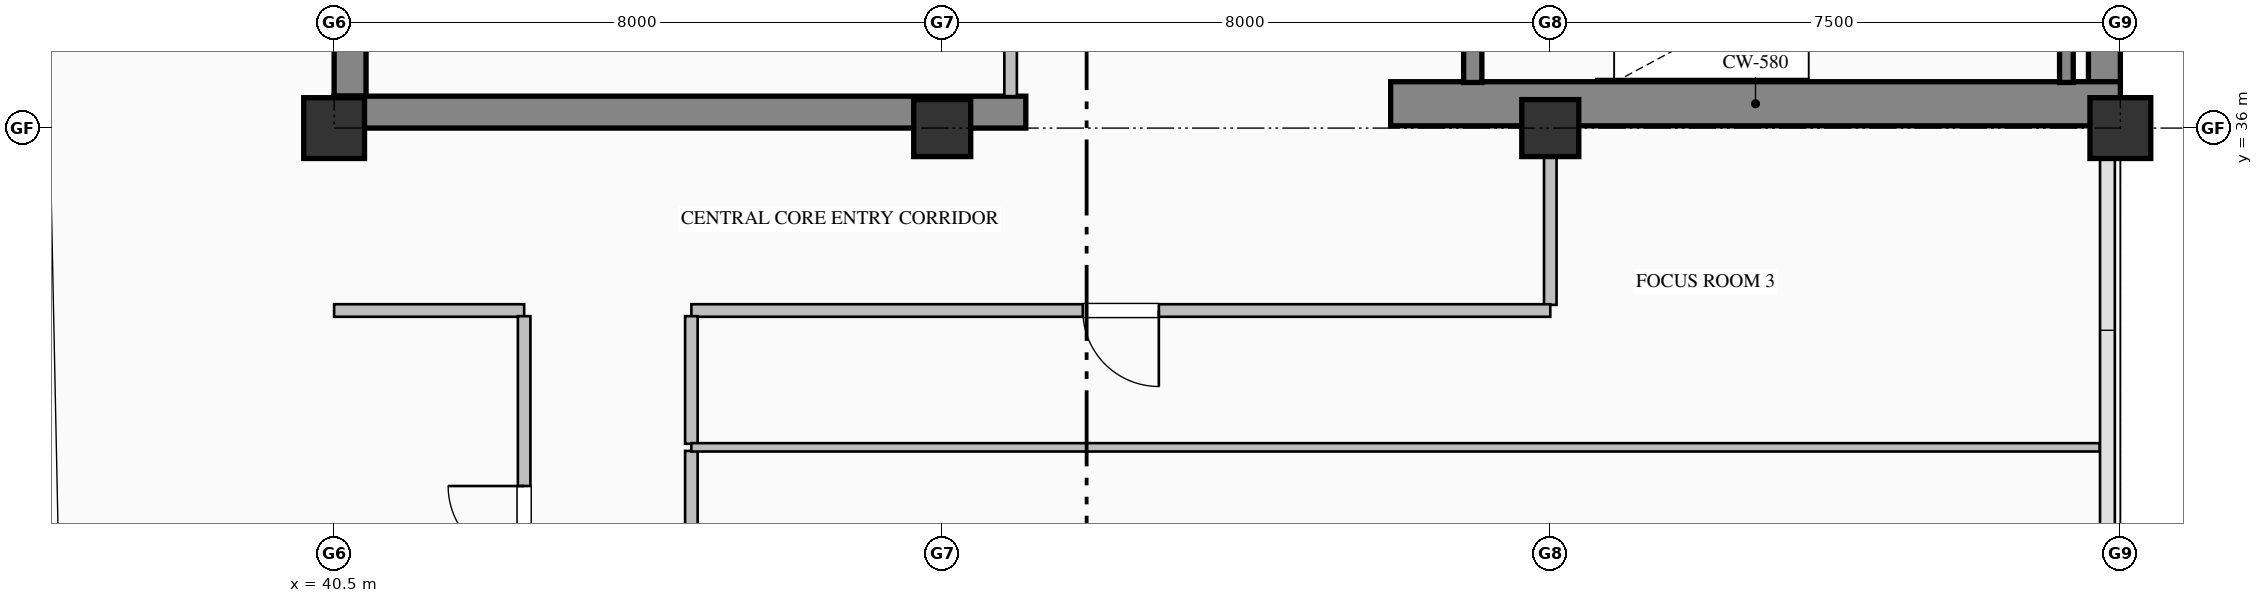
"""IFC4 building model, lengths in metres.
Left out: names, types, materials, properties, quantities, classifications, styles, units other than length and angle.
Written with IfcOpenShell. Run it as: python <this file> out.ifc"""

import sys

from ifc_helpers import new_model, si_unit, direction, frame, frame_2d, origin, origin_2d, place, context, subcontext, project, spatial, rectangle, hollow_rectangle, extrude, element, fill, save


model = new_model("IFC4")
c1 = context("Model", 3, precision=1e-05, world=origin(), true_north=direction((0.0, 1.0)))
c2 = subcontext(c1, "Body", "Model", "MODEL_VIEW")
j1 = project(units=[si_unit("LENGTHUNIT", "METRE"), si_unit("PLANEANGLEUNIT", "RADIAN")], contexts=[c1])
p1 = place(None, origin())
s1 = spatial("IfcSite", under=j1, at=p1, CompositionType="ELEMENT")
p2 = place(p1, origin())
s2 = spatial("IfcBuilding", under=s1, at=p2, CompositionType="ELEMENT")
p3 = place(p2, frame((0.0, 0.0, 295.2)))
s3 = spatial("IfcBuildingStorey", under=s2, at=p3, CompositionType="ELEMENT", Elevation=295.2)
p4 = place(p3, frame((63.79, 36.32, 0.0), z_axis=(0.0, 0.0, 1.0), x_axis=(0.0, 1.0, 0.0)))
e1 = element("IfcWall", 1, at=p4, inside=s3, PredefinedType="SHEAR", context=c2, shape_type="SweptSolid", body=[
    extrude(rectangle(XDim=15.26, YDim=0.42, at=frame_2d((7.63, 0.0))), origin(), (0.0, 0.0, 1.0), 3.785),
])
p5 = place(p3, frame((40.71, 36.42, 0.0), z_axis=(0.0, 0.0, 1.0), x_axis=(0.0, 1.0, 0.0)))
e2 = element("IfcWall", 2, at=p5, inside=s3, PredefinedType="SHEAR", context=c2, shape_type="SweptSolid", body=[
    extrude(rectangle(XDim=7.98, YDim=0.42, at=frame_2d((3.99, 0.0))), origin(), (0.0, 0.0, 1.0), 3.785),
])
p6 = place(p3, frame((40.5, 36.21, 0.0), z_axis=(0.0, 0.0, 1.0), x_axis=(1.0, 0.0, 0.0)))
e3 = element("IfcWall", 3, at=p6, inside=s3, PredefinedType="SHEAR", context=c2, shape_type="SweptSolid", body=[
    extrude(rectangle(XDim=9.1, YDim=0.42, at=frame_2d((4.55, 0.0))), origin(), (0.0, 0.0, 1.0), 3.785),
])
p7 = place(p3, frame((54.4, 36.32, 0.0), z_axis=(0.0, 0.0, 1.0), x_axis=(1.0, 0.0, 0.0)))
e4 = element("IfcWall", 4, at=p7, inside=s3, PredefinedType="SHEAR", context=c2, shape_type="SweptSolid", body=[
    extrude(rectangle(XDim=9.6, YDim=0.58, at=frame_2d((4.8, 0.0))), origin(), (0.0, 0.0, 1.0), 4.0),
])
p8 = place(p3, frame((40.5, 36.0, 0.0), z_axis=(0.0, 0.0, 1.0), x_axis=(1.0, 0.0, 0.0)))
e5 = element("IfcColumn", 5, at=p8, inside=s3, PredefinedType="COLUMN", context=c2, shape_type="SweptSolid", body=[
    extrude(hollow_rectangle(XDim=0.8, YDim=0.8, WallThickness=0.032, at=origin_2d()), origin(), (0.0, 0.0, 1.0), 4.0),
])
for number, where, z_axis, x_axis in (
    (6, (48.5, 36.0, 0.0), (0.0, 0.0, 1.0), (1.0, 0.0, 0.0)),
    (7, (56.5, 36.0, 0.0), (0.0, 0.0, 1.0), (1.0, 0.0, 0.0)),
):
    element("IfcColumn", number, at=place(p3, frame(where, z_axis=z_axis, x_axis=x_axis)), inside=s3, PredefinedType="COLUMN", context=c2, shape_type="SweptSolid", body=[
        extrude(rectangle(XDim=0.75, YDim=0.75, at=origin_2d()), origin(), (0.0, 0.0, 1.0), 4.0),
    ])
p9 = place(p3, frame((64.0, 36.0, 0.0), z_axis=(0.0, 0.0, 1.0), x_axis=(1.0, 0.0, 0.0)))
e8 = element("IfcColumn", 8, at=p9, inside=s3, PredefinedType="COLUMN", context=c2, shape_type="SweptSolid", body=[
    extrude(hollow_rectangle(XDim=0.8, YDim=0.8, WallThickness=0.032, at=origin_2d()), origin(), (0.0, 0.0, 1.0), 4.0),
])
p10 = place(p3, frame((55.48, 39.75, 0.0), z_axis=(0.0, 0.0, 1.0), x_axis=(0.0, -1.0, 0.0)))
e9 = element("IfcWall", 9, at=p10, inside=s3, PredefinedType="SOLIDWALL", context=c2, shape_type="SweptSolid", body=[
    extrude(rectangle(XDim=3.15, YDim=0.24, at=frame_2d((1.575, 0.0))), origin(), (0.0, 0.0, 1.0), 4.0),
])
p11 = place(p10, frame((1.0, 0.0, 0.0)))
e10 = element("IfcOpeningElement", 10, at=p11, cuts=e9, PredefinedType="OPENING", context=c2, shape_type="SweptSolid", body=[
    extrude(rectangle(XDim=1.15, YDim=2.2, at=frame_2d((0.575, 1.1))), frame((0.0, 0.13, 0.0), z_axis=(0.0, -1.0, 0.0), x_axis=(1.0, 0.0, 0.0)), (0.0, 0.0, 1.0), 0.26),
])
p12 = place(p3, frame((63.29, 36.6, 0.0), z_axis=(0.0, 0.0, 1.0), x_axis=(0.0, 1.0, 0.0)))
e11 = element("IfcWall", 11, at=p12, inside=s3, PredefinedType="SOLIDWALL", context=c2, shape_type="SweptSolid", body=[
    extrude(rectangle(XDim=3.15, YDim=0.18, at=frame_2d((1.575, 0.0))), origin(), (0.0, 0.0, 1.0), 4.0),
])
p13 = place(p3, frame((49.4, 36.42, 0.0), z_axis=(0.0, 0.0, 1.0), x_axis=(0.0, 1.0, 0.0)))
e12 = element("IfcWall", 12, at=p13, inside=s3, PredefinedType="PARTITIONING", context=c2, shape_type="SweptSolid", body=[
    extrude(rectangle(XDim=3.133, YDim=0.165, at=frame_2d((1.566, 0.0))), origin(), (0.0, 0.0, 1.0), 3.027),
])
p14 = place(p13, frame((1.066, 0.0, 0.0)))
e13 = element("IfcOpeningElement", 13, at=p14, cuts=e12, PredefinedType="OPENING", context=c2, shape_type="SweptSolid", body=[
    extrude(rectangle(XDim=1.0, YDim=2.15, at=frame_2d((0.5, 1.075))), frame((0.0, 0.093, 0.0), z_axis=(0.0, -1.0, 0.0), x_axis=(1.0, 0.0, 0.0)), (0.0, 0.0, 1.0), 0.185),
])
p15 = place(p3, frame((56.5, 36.0, 0.0), z_axis=(0.0, 0.0, 1.0), x_axis=(0.0, -1.0, 0.0)))
e14 = element("IfcWall", 14, at=p15, inside=s3, PredefinedType="PARTITIONING", context=c2, shape_type="SweptSolid", body=[
    extrude(rectangle(XDim=2.325, YDim=0.165, at=frame_2d((1.163, 0.0))), origin(), (0.0, 0.0, 1.0), 3.177),
])
p16 = place(p3, frame((56.5, 33.6, 0.0), z_axis=(0.0, 0.0, 1.0), x_axis=(-1.0, 0.0, 0.0)))
e15 = element("IfcWall", 15, at=p16, inside=s3, PredefinedType="PARTITIONING", context=c2, shape_type="SweptSolid", body=[
    extrude(rectangle(XDim=11.3, YDim=0.165, at=frame_2d((5.65, 0.0))), origin(), (0.0, 0.0, 1.0), 3.785),
])
p17 = place(p16, frame((5.15, 0.0, 0.0)))
e16 = element("IfcOpeningElement", 16, at=p17, cuts=e15, PredefinedType="OPENING", context=c2, shape_type="SweptSolid", body=[
    extrude(rectangle(XDim=1.0, YDim=2.15, at=frame_2d((0.5, 1.075))), frame((0.0, 0.093, 0.0), z_axis=(0.0, -1.0, 0.0), x_axis=(1.0, 0.0, 0.0)), (0.0, 0.0, 1.0), 0.185),
])
p18 = place(p3, frame((43.0, 33.6, 0.0), z_axis=(0.0, 0.0, 1.0), x_axis=(-1.0, 0.0, 0.0)))
e17 = element("IfcWall", 17, at=p18, inside=s3, PredefinedType="PARTITIONING", context=c2, shape_type="SweptSolid", body=[
    extrude(rectangle(XDim=2.5, YDim=0.165, at=frame_2d((1.25, 0.0))), origin(), (0.0, 0.0, 1.0), 3.785),
])
p19 = place(p3, frame((45.2, 31.753, 0.0), z_axis=(0.0, 0.0, 1.0), x_axis=(0.0, -1.0, 0.0)))
e18 = element("IfcWall", 18, at=p19, inside=s3, PredefinedType="PARTITIONING", context=c2, shape_type="SweptSolid", body=[
    extrude(rectangle(XDim=3.706, YDim=0.165, at=frame_2d((1.853, 0.0))), origin(), (0.0, 0.0, 1.0), 3.785),
])
p20 = place(p19, frame((1.303, 0.0, 0.0)))
e19 = element("IfcOpeningElement", 19, at=p20, cuts=e18, PredefinedType="OPENING", context=c2, shape_type="SweptSolid", body=[
    extrude(rectangle(XDim=1.1, YDim=2.2, at=frame_2d((0.55, 1.1))), frame((0.0, 0.093, 0.0), z_axis=(0.0, -1.0, 0.0), x_axis=(1.0, 0.0, 0.0)), (0.0, 0.0, 1.0), 0.185),
])
p21 = place(p3, frame((45.2, 33.525, 0.0), z_axis=(0.0, 0.0, 1.0), x_axis=(0.0, -1.0, 0.0)))
e20 = element("IfcWall", 20, at=p21, inside=s3, PredefinedType="PARTITIONING", context=c2, shape_type="SweptSolid", body=[
    extrude(rectangle(XDim=1.678, YDim=0.165, at=frame_2d((0.839, 0.0))), origin(), (0.0, 0.0, 1.0), 3.785),
])
p22 = place(p3, frame((43.0, 28.057, 0.0), z_axis=(0.0, 0.0, 1.0), x_axis=(0.0, 1.0, 0.0)))
e21 = element("IfcWall", 21, at=p22, inside=s3, PredefinedType="PARTITIONING", context=c2, shape_type="SweptSolid", body=[
    extrude(rectangle(XDim=5.469, YDim=0.165, at=frame_2d((2.734, 0.0))), origin(), (0.0, 0.0, 1.0), 3.785),
])
p23 = place(p22, frame((2.234, 0.0, 0.0)))
e22 = element("IfcOpeningElement", 22, at=p23, cuts=e21, PredefinedType="OPENING", context=c2, shape_type="SweptSolid", body=[
    extrude(rectangle(XDim=1.0, YDim=2.15, at=frame_2d((0.5, 1.075))), frame((0.0, 0.093, 0.0), z_axis=(0.0, -1.0, 0.0), x_axis=(1.0, 0.0, 0.0)), (0.0, 0.0, 1.0), 0.185),
])
p24 = place(p3, frame((45.2, 31.8, 0.0), z_axis=(0.0, 0.0, 1.0), x_axis=(1.0, 0.0, 0.0)))
e23 = element("IfcWall", 23, at=p24, inside=s3, PredefinedType="MOVABLE", context=c2, shape_type="SweptSolid", body=[
    extrude(rectangle(XDim=18.528, YDim=0.11, at=frame_2d((9.264, 0.0))), origin(), (0.0, 0.0, 1.0), 3.785),
])
p25 = place(p17, origin())
e24 = element("IfcDoor", 24, at=p25, inside=s3, OperationType="SINGLE_SWING_LEFT", PredefinedType="DOOR", context=c2, shape_type="SweptSolid", body=[
    extrude(rectangle(XDim=1.0, YDim=2.15, at=frame_2d((0.5, 1.075))), frame((0.0, 0.025, 0.0), z_axis=(0.0, -1.0, 0.0), x_axis=(1.0, 0.0, 0.0)), (0.0, 0.0, 1.0), 0.05),
])
fill(e16, e24)
p26 = place(p23, origin())
e25 = element("IfcDoor", 25, at=p26, inside=s3, OperationType="SINGLE_SWING_RIGHT", PredefinedType="DOOR", context=c2, shape_type="SweptSolid", body=[
    extrude(rectangle(XDim=1.0, YDim=2.15, at=frame_2d((0.5, 1.075))), frame((0.0, 0.025, 0.0), z_axis=(0.0, -1.0, 0.0), x_axis=(1.0, 0.0, 0.0)), (0.0, 0.0, 1.0), 0.05),
])
fill(e22, e25)
save(model, sys.argv[1])
